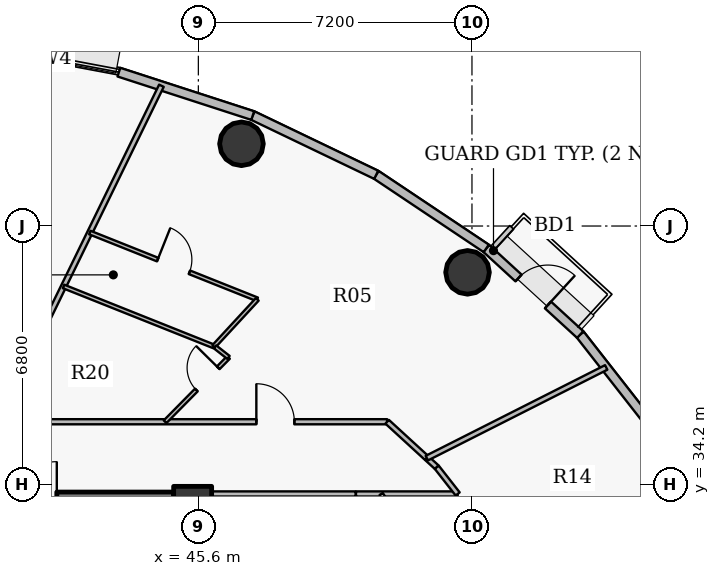
"""IFC4 building model, lengths in metres.
Left out: names, types, materials, properties, quantities, classifications, styles, units other than length and angle.
Written with IfcOpenShell. Run it as: python <this file> out.ifc"""

import sys

from ifc_helpers import new_model, si_unit, direction, frame, frame_2d, origin, origin_2d, place, context, subcontext, project, spatial, rectangle, hollow_circle, extrude, source, transform, mapped, element, fill, save


model = new_model("IFC4")
c1 = context("Model", 3, precision=1e-05, world=origin(), true_north=direction((0.0, 1.0)))
c2 = subcontext(c1, "Body", "Model", "MODEL_VIEW")
j1 = project(units=[si_unit("LENGTHUNIT", "METRE"), si_unit("PLANEANGLEUNIT", "RADIAN")], contexts=[c1])
p1 = place(None, origin())
s1 = spatial("IfcSite", under=j1, at=p1, CompositionType="ELEMENT")
p2 = place(p1, origin())
s2 = spatial("IfcBuilding", under=s1, at=p2, CompositionType="ELEMENT")
p3 = place(p2, frame((0.0, 0.0, 225.3)))
s3 = spatial("IfcBuildingStorey", under=s2, at=p3, CompositionType="ELEMENT", Elevation=225.3)
p4 = place(p3, frame((45.45, 33.65, 0.0), z_axis=(0.0, 0.0, 1.0), x_axis=(1.0, 0.0, 0.0)))
e1 = element("IfcColumn", 1, at=p4, inside=s3, PredefinedType="COLUMN", context=c2, shape_type="SweptSolid", body=[
    extrude(rectangle(XDim=1.0, YDim=1.0, at=origin_2d()), origin(), (0.0, 0.0, 1.0), 3.75),
])
p5 = place(p3, frame((27.05, 33.65, 0.0), z_axis=(0.0, 0.0, 1.0), x_axis=(1.0, 0.0, 0.0)))
e2 = element("IfcWall", 2, at=p5, inside=s3, PredefinedType="SHEAR", context=c2, shape_type="SweptSolid", body=[
    extrude(rectangle(XDim=17.9, YDim=0.7, at=frame_2d((8.95, 0.0))), origin(), (0.0, 0.0, 1.0), 3.05),
])
p6 = place(p5, frame((13.675, 0.0, 0.0)))
e3 = element("IfcOpeningElement", 3, at=p6, cuts=e2, PredefinedType="OPENING", context=c2, shape_type="SweptSolid", body=[
    extrude(rectangle(XDim=1.15, YDim=2.15, at=origin_2d()), frame((0.575, 0.36, 1.075), z_axis=(0.0, -1.0, 0.0), x_axis=(1.0, 0.0, 0.0)), (0.0, 0.0, 1.0), 0.72),
])
for number, where, z_axis, x_axis in (
    (4, (52.683, 39.781, 0.0), (0.0, 0.0, 1.0), (1.0, 0.0, 0.0)),
    (5, (46.735, 43.164, 0.0), (0.0, 0.0, 1.0), (1.0, 0.0, 0.0)),
):
    element("IfcColumn", number, at=place(p3, frame(where, z_axis=z_axis, x_axis=x_axis)), inside=s3, PredefinedType="COLUMN", context=c2, shape_type="SweptSolid", body=[
        extrude(hollow_circle(Radius=0.575, WallThickness=0.036, at=origin_2d()), origin(), (0.0, 0.0, 1.0), 3.75),
    ])
p7 = place(p3, frame((55.648, 38.145, 0.0), z_axis=(0.0, 0.0, 1.0), x_axis=(0.616312344705, -0.787501805562, 0.0)))
e6 = element("IfcWall", 6, at=p7, inside=s3, PredefinedType="SOLIDWALL", context=c2, shape_type="SweptSolid", body=[
    extrude(rectangle(XDim=3.225, YDim=0.24, at=frame_2d((1.612, 0.0))), origin(), (0.0, 0.0, 1.0), 3.5),
])
p8 = place(p3, frame((53.176, 40.411, 0.0), z_axis=(0.0, 0.0, 1.0), x_axis=(0.737123922599, -0.675757591694, 0.0)))
e7 = element("IfcWall", 7, at=p8, inside=s3, PredefinedType="SOLIDWALL", context=c2, shape_type="SweptSolid", body=[
    extrude(rectangle(XDim=3.354, YDim=0.24, at=frame_2d((1.677, 0.0))), origin(), (0.0, 0.0, 1.0), 3.5),
])
p9 = place(p8, frame((1.152, 0.0, 0.0)))
e8 = element("IfcOpeningElement", 8, at=p9, cuts=e7, PredefinedType="OPENING", context=c2, shape_type="SweptSolid", body=[
    extrude(rectangle(XDim=1.05, YDim=2.15, at=origin_2d()), frame((0.525, 0.13, 1.075), z_axis=(0.0, -1.0, 0.0), x_axis=(1.0, 0.0, 0.0)), (0.0, 0.0, 1.0), 0.26),
])
p10 = place(p3, frame((50.28, 42.348, 0.0), z_axis=(0.0, 0.0, 1.0), x_axis=(0.831262496074, -0.555880079352, 0.0)))
e9 = element("IfcWall", 9, at=p10, inside=s3, PredefinedType="SOLIDWALL", context=c2, shape_type="SweptSolid", body=[
    extrude(rectangle(XDim=3.484, YDim=0.24, at=frame_2d((1.742, 0.0))), origin(), (0.0, 0.0, 1.0), 3.5),
])
p11 = place(p3, frame((47.031, 43.906, 0.0), z_axis=(0.0, 0.0, 1.0), x_axis=(0.901598104751, -0.432574684313, 0.0)))
e10 = element("IfcWall", 10, at=p11, inside=s3, PredefinedType="SOLIDWALL", context=c2, shape_type="SweptSolid", body=[
    extrude(rectangle(XDim=3.604, YDim=0.24, at=frame_2d((1.802, 0.0))), origin(), (0.0, 0.0, 1.0), 3.5),
])
p12 = place(p3, frame((43.509, 45.049, 0.0), z_axis=(0.0, 0.0, 1.0), x_axis=(0.951210789182, -0.308541787354, 0.0)))
e11 = element("IfcWall", 11, at=p12, inside=s3, PredefinedType="SOLIDWALL", context=c2, shape_type="SweptSolid", body=[
    extrude(rectangle(XDim=3.702, YDim=0.24, at=frame_2d((1.851, 0.0))), origin(), (0.0, 0.0, 1.0), 3.5),
])
p13 = place(p3, frame((24.35, 35.85, 0.0), z_axis=(0.0, 0.0, 1.0), x_axis=(1.0, 0.0, 0.0)))
e12 = element("IfcWall", 12, at=p13, inside=s3, PredefinedType="PARTITIONING", context=c2, shape_type="SweptSolid", body=[
    extrude(rectangle(XDim=26.218, YDim=0.135, at=frame_2d((13.109, 0.0))), origin(), (0.0, 0.0, 1.0), 2.935),
])
p14 = place(p13, frame((3.557, 0.0, 0.0)))
e13 = element("IfcOpeningElement", 13, at=p14, cuts=e12, PredefinedType="OPENING", context=c2, shape_type="SweptSolid", body=[
    extrude(rectangle(XDim=1.0, YDim=2.15, at=origin_2d()), frame((0.5, 0.078, 1.075), z_axis=(0.0, -1.0, 0.0), x_axis=(1.0, 0.0, 0.0)), (0.0, 0.0, 1.0), 0.155),
])
p15 = place(p13, frame((22.776, 0.0, 0.0)))
e14 = element("IfcOpeningElement", 14, at=p15, cuts=e12, PredefinedType="OPENING", context=c2, shape_type="SweptSolid", body=[
    extrude(rectangle(XDim=1.0, YDim=2.15, at=origin_2d()), frame((0.5, 0.078, 1.075), z_axis=(0.0, -1.0, 0.0), x_axis=(1.0, 0.0, 0.0)), (0.0, 0.0, 1.0), 0.155),
])
p16 = place(p13, frame((13.736, 0.0, 0.0)))
e15 = element("IfcOpeningElement", 15, at=p16, cuts=e12, PredefinedType="OPENING", context=c2, shape_type="SweptSolid", body=[
    extrude(rectangle(XDim=1.05, YDim=2.15, at=origin_2d()), frame((0.525, 0.078, 1.075), z_axis=(0.0, -1.0, 0.0), x_axis=(1.0, 0.0, 0.0)), (0.0, 0.0, 1.0), 0.155),
])
p17 = place(p13, frame((10.682, 0.0, 0.0)))
e16 = element("IfcOpeningElement", 16, at=p17, cuts=e12, PredefinedType="OPENING", context=c2, shape_type="SweptSolid", body=[
    extrude(rectangle(XDim=1.05, YDim=2.15, at=origin_2d()), frame((0.525, 0.078, 1.075), z_axis=(0.0, -1.0, 0.0), x_axis=(1.0, 0.0, 0.0)), (0.0, 0.0, 1.0), 0.155),
])
p18 = place(p13, frame((8.557, 0.0, 0.0)))
e17 = element("IfcOpeningElement", 17, at=p18, cuts=e12, PredefinedType="OPENING", context=c2, shape_type="SweptSolid", body=[
    extrude(rectangle(XDim=0.82, YDim=2.1, at=origin_2d()), frame((0.41, 0.078, 1.05), z_axis=(0.0, -1.0, 0.0), x_axis=(1.0, 0.0, 0.0)), (0.0, 0.0, 1.0), 0.155),
])
p19 = place(p3, frame((40.316, 35.85, 0.0), z_axis=(0.0, 0.0, 1.0), x_axis=(0.438375708348, 0.898791821464, 0.0)))
e18 = element("IfcWall", 18, at=p19, inside=s3, PredefinedType="PARTITIONING", context=c2, shape_type="SweptSolid", body=[
    extrude(rectangle(XDim=9.836, YDim=0.135, at=frame_2d((4.918, 0.0))), origin(), (0.0, 0.0, 1.0), 2.985),
])
p20 = place(p3, frame((42.053, 39.41, 0.0), z_axis=(0.0, 0.0, 1.0), x_axis=(0.928800647075, -0.370579759286, 0.0)))
e19 = element("IfcWall", 19, at=p20, inside=s3, PredefinedType="PARTITIONING", context=c2, shape_type="SweptSolid", body=[
    extrude(rectangle(XDim=4.257, YDim=0.1, at=frame_2d((2.129, 0.0))), origin(), (0.0, 0.0, 1.0), 2.935),
])
p21 = place(p3, frame((42.744, 40.828, 0.0), z_axis=(0.0, 0.0, 1.0), x_axis=(0.928817025393, -0.370538706939, 0.0)))
e20 = element("IfcWall", 20, at=p21, inside=s3, PredefinedType="PARTITIONING", context=c2, shape_type="SweptSolid", body=[
    extrude(rectangle(XDim=4.744, YDim=0.1, at=frame_2d((2.372, 0.0))), origin(), (0.0, 0.0, 1.0), 2.935),
])
p22 = place(p21, frame((1.922, 0.0, 0.0)))
e21 = element("IfcOpeningElement", 21, at=p22, cuts=e20, PredefinedType="OPENING", context=c2, shape_type="SweptSolid", body=[
    extrude(rectangle(XDim=0.9, YDim=2.1, at=origin_2d()), frame((0.45, 0.06, 1.05), z_axis=(0.0, -1.0, 0.0), x_axis=(1.0, 0.0, 0.0)), (0.0, 0.0, 1.0), 0.12),
])
p23 = place(p3, frame((44.724, 35.85, 0.0), z_axis=(0.0, 0.0, 1.0), x_axis=(0.702107196604, 0.712071263622, 0.0)))
e22 = element("IfcWall", 22, at=p23, inside=s3, PredefinedType="PARTITIONING", context=c2, shape_type="SweptSolid", body=[
    extrude(rectangle(XDim=2.377, YDim=0.1, at=frame_2d((1.188, 0.0))), origin(), (0.0, 0.0, 1.0), 3.5),
])
p24 = place(p23, frame((1.173, 0.0, 0.0)))
e23 = element("IfcOpeningElement", 23, at=p24, cuts=e22, PredefinedType="OPENING", context=c2, shape_type="SweptSolid", body=[
    extrude(rectangle(XDim=0.82, YDim=2.1, at=origin_2d()), frame((0.41, 0.06, 1.05), z_axis=(0.0, -1.0, 0.0), x_axis=(1.0, 0.0, 0.0)), (0.0, 0.0, 1.0), 0.12),
])
p25 = place(p3, frame((46.007, 37.832, 0.0), z_axis=(0.0, 0.0, 1.0), x_axis=(0.678598883011, 0.734509057791, 0.0)))
e24 = element("IfcWall", 24, at=p25, inside=s3, PredefinedType="PARTITIONING", context=c2, shape_type="SweptSolid", body=[
    extrude(rectangle(XDim=1.686, YDim=0.1, at=frame_2d((0.843, 0.0))), origin(), (0.0, 0.0, 1.0), 3.125),
])
p26 = place(p3, frame((46.039, 37.819, 0.0), z_axis=(0.0, 0.0, 1.0), x_axis=(0.787505001008, -0.616308261658, 0.0)))
e25 = element("IfcWall", 25, at=p26, inside=s3, PredefinedType="PARTITIONING", context=c2, shape_type="SweptSolid", body=[
    extrude(rectangle(XDim=0.449, YDim=0.1, at=frame_2d((0.225, 0.0))), origin(), (0.0, 0.0, 1.0), 3.5),
])
p27 = place(p3, frame((49.748, 33.95, 0.0), z_axis=(0.0, 0.0, 1.0), x_axis=(1.0, 0.0, 0.0)))
e26 = element("IfcWall", 26, at=p27, inside=s3, PredefinedType="PARTITIONING", context=c2, shape_type="SweptSolid", body=[
    extrude(rectangle(XDim=2.676, YDim=0.135, at=frame_2d((1.338, 0.0))), origin(), (0.0, 0.0, 1.0), 3.5),
])
p28 = place(p3, frame((50.411, 33.95, 0.0), z_axis=(0.0, 0.0, 1.0), x_axis=(0.545427530909, -0.838157985422, 0.0)))
e27 = element("IfcWall", 27, at=p28, inside=s3, PredefinedType="PARTITIONING", context=c2, shape_type="SweptSolid", body=[
    extrude(rectangle(XDim=3.36, YDim=0.1, at=frame_2d((1.68, 0.0))), origin(), (0.0, 0.0, 1.0), 2.935),
])
p29 = place(p28, frame((1.135, 0.0, 0.0)))
e28 = element("IfcOpeningElement", 28, at=p29, cuts=e27, PredefinedType="OPENING", context=c2, shape_type="SweptSolid", body=[
    extrude(rectangle(XDim=0.9, YDim=2.1, at=origin_2d()), frame((0.45, 0.06, 1.05), z_axis=(0.0, -1.0, 0.0), x_axis=(1.0, 0.0, 0.0)), (0.0, 0.0, 1.0), 0.12),
])
p30 = place(p3, frame((50.568, 35.85, 0.0), z_axis=(0.0, 0.0, 1.0), x_axis=(0.737032525587, -0.675857275042, 0.0)))
e29 = element("IfcWall", 29, at=p30, inside=s3, PredefinedType="PARTITIONING", context=c2, shape_type="SweptSolid", body=[
    extrude(rectangle(XDim=1.417, YDim=0.135, at=frame_2d((0.708, 0.0))), origin(), (0.0, 0.0, 1.0), 3.5),
])
p31 = place(p3, frame((51.62, 34.886, 0.0), z_axis=(0.0, 0.0, 1.0), x_axis=(0.736889635292, -0.676013065998, 0.0)))
e30 = element("IfcWall", 30, at=p31, inside=s3, PredefinedType="PARTITIONING", context=c2, shape_type="SweptSolid", body=[
    extrude(rectangle(XDim=0.345, YDim=0.135, at=frame_2d((0.172, 0.0))), origin(), (0.0, 0.0, 1.0), 3.5),
])
p32 = place(p3, frame((51.612, 34.893, 0.0), z_axis=(0.0, 0.0, 1.0), x_axis=(0.892442847759, 0.451160463122, 0.0)))
e31 = element("IfcWall", 31, at=p32, inside=s3, PredefinedType="PARTITIONING", context=c2, shape_type="SweptSolid", body=[
    extrude(rectangle(XDim=5.289, YDim=0.135, at=frame_2d((2.645, 0.0))), origin(), (0.0, 0.0, 1.0), 2.985),
])
p33 = place(p3, frame((51.874, 34.653, 0.0), z_axis=(0.0, 0.0, 1.0), x_axis=(0.61628613448, -0.787522317429, 0.0)))
e32 = element("IfcWall", 32, at=p33, inside=s3, PredefinedType="PARTITIONING", context=c2, shape_type="SweptSolid", body=[
    extrude(rectangle(XDim=0.893, YDim=0.135, at=frame_2d((0.446, 0.0))), origin(), (0.0, 0.0, 1.0), 3.5),
])
p34 = place(p3, frame((49.738, 33.95, 0.0), z_axis=(0.0, 0.0, 1.0), x_axis=(-1.0, 0.0, 0.0)))
e33 = element("IfcWall", 33, at=p34, inside=s3, PredefinedType="PARTITIONING", context=c2, shape_type="SweptSolid", body=[
    extrude(rectangle(XDim=3.938, YDim=0.135, at=frame_2d((1.969, 0.0))), origin(), (0.0, 0.0, 1.0), 3.5),
])
p35 = place(p3, frame((45.79, 34.0, 0.0), z_axis=(0.0, 0.0, 1.0), x_axis=(-1.0, 0.0, 0.0)))
e34 = element("IfcWall", 34, at=p35, inside=s3, PredefinedType="PARTITIONING", context=c2, shape_type="SweptSolid", body=[
    extrude(rectangle(XDim=0.83, YDim=0.135, at=frame_2d((0.415, 0.0))), origin(), (0.0, 0.0, 1.0), 2.935),
])
m1 = source(origin(), c2, "Body", "SweptSolid", [
    extrude(rectangle(XDim=1.05, YDim=2.15, at=origin_2d()), frame((0.525, 0.025, 1.075), z_axis=(0.0, -1.0, 0.0), x_axis=(1.0, 0.0, 0.0)), (0.0, 0.0, 1.0), 0.05),
])
p36 = place(p9, origin())
e35 = element("IfcDoor", 35, at=p36, inside=s3, OperationType="SINGLE_SWING_RIGHT", PredefinedType="DOOR", context=c2, shape_type="MappedRepresentation", body=[
    mapped(m1, transform((0.0, 0.0, 0.0), x_axis=(1.0, 0.0, 0.0), y_axis=(0.0, 1.0, 0.0), z_axis=(0.0, 0.0, 1.0), scale=1.0)),
])
fill(e8, e35)
m2 = source(origin(), c2, "Body", "SweptSolid", [
    extrude(rectangle(XDim=1.0, YDim=2.15, at=origin_2d()), frame((0.5, 0.025, 1.075), z_axis=(0.0, -1.0, 0.0), x_axis=(1.0, 0.0, 0.0)), (0.0, 0.0, 1.0), 0.05),
])
p37 = place(p15, origin())
e36 = element("IfcDoor", 36, at=p37, inside=s3, OperationType="SINGLE_SWING_LEFT", PredefinedType="DOOR", context=c2, shape_type="MappedRepresentation", body=[
    mapped(m2, transform((0.0, 0.0, 0.0), x_axis=(1.0, 0.0, 0.0), y_axis=(0.0, 1.0, 0.0), z_axis=(0.0, 0.0, 1.0), scale=1.0)),
])
fill(e14, e36)
m3 = source(origin(), c2, "Body", "SweptSolid", [
    extrude(rectangle(XDim=0.82, YDim=2.1, at=origin_2d()), frame((0.41, 0.025, 1.05), z_axis=(0.0, -1.0, 0.0), x_axis=(1.0, 0.0, 0.0)), (0.0, 0.0, 1.0), 0.05),
])
p38 = place(p24, origin())
e37 = element("IfcDoor", 37, at=p38, inside=s3, OperationType="SINGLE_SWING_RIGHT", PredefinedType="DOOR", context=c2, shape_type="MappedRepresentation", body=[
    mapped(m3, transform((0.0, 0.0, 0.0), x_axis=(1.0, 0.0, 0.0), y_axis=(0.0, 1.0, 0.0), z_axis=(0.0, 0.0, 1.0), scale=1.0)),
])
fill(e23, e37)
m4 = source(origin(), c2, "Body", "SweptSolid", [
    extrude(rectangle(XDim=0.9, YDim=2.1, at=origin_2d()), frame((0.45, 0.025, 1.05), z_axis=(0.0, -1.0, 0.0), x_axis=(1.0, 0.0, 0.0)), (0.0, 0.0, 1.0), 0.05),
])
p39 = place(p22, origin())
e38 = element("IfcDoor", 38, at=p39, inside=s3, OperationType="SINGLE_SWING_LEFT", PredefinedType="DOOR", context=c2, shape_type="MappedRepresentation", body=[
    mapped(m4, transform((0.0, 0.0, 0.0), x_axis=(1.0, 0.0, 0.0), y_axis=(0.0, 1.0, 0.0), z_axis=(0.0, 0.0, 1.0), scale=1.0)),
])
fill(e21, e38)
save(model, sys.argv[1])
